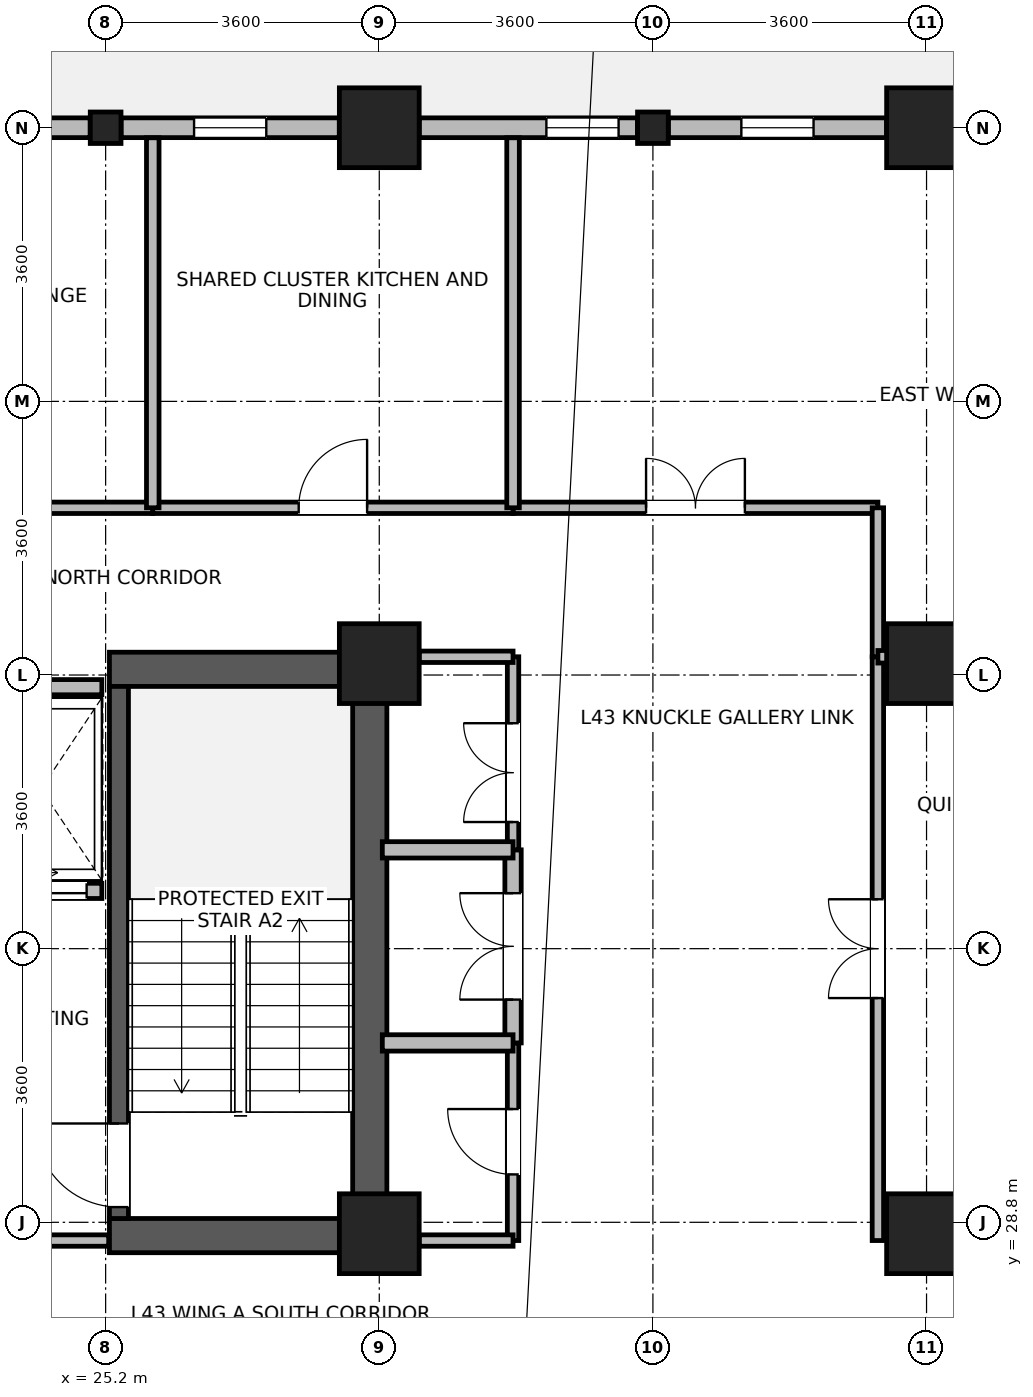
"""IFC4 building model, lengths in metres.
Left out: names, types, materials, properties, quantities, classifications, styles, units other than length and angle.
Written with IfcOpenShell. Run it as: python <this file> out.ifc"""

import sys

from ifc_helpers import new_model, si_unit, direction, frame, frame_2d, origin, origin_2d, place, context, subcontext, project, spatial, rectangle, i_section, extrude, source, transform, mapped, element, fill, save


model = new_model("IFC4")
c1 = context("Model", 3, precision=1e-05, world=origin(), true_north=direction((0.0, 1.0)))
c2 = subcontext(c1, "Body", "Model", "MODEL_VIEW")
j1 = project(units=[si_unit("LENGTHUNIT", "METRE"), si_unit("PLANEANGLEUNIT", "RADIAN")], contexts=[c1])
p1 = place(None, origin())
s1 = spatial("IfcSite", under=j1, at=p1, CompositionType="ELEMENT")
p2 = place(p1, origin())
s2 = spatial("IfcBuilding", under=s1, at=p2, CompositionType="ELEMENT")
p3 = place(p2, frame((0.0, 0.0, 169.8)))
s3 = spatial("IfcBuildingStorey", under=s2, at=p3, CompositionType="ELEMENT", Elevation=169.8)
p4 = place(p3, frame((28.675, 28.4, 0.0), z_axis=(0.0, 0.0, 1.0), x_axis=(0.0, 1.0, 0.0)))
e1 = element("IfcWall", 1, at=p4, inside=s3, PredefinedType="SHEAR", context=c2, shape_type="SweptSolid", body=[
    extrude(rectangle(XDim=7.9, YDim=0.45, at=frame_2d((3.95, 0.0))), origin(), (0.0, 0.0, 1.0), 3.46),
])
for number, where, z_axis, x_axis in (
    (2, (25.25, 28.625, 0.0), (0.0, 0.0, 1.0), (1.0, 0.0, 0.0)),
    (3, (25.25, 36.075, 0.0), (0.0, 0.0, 1.0), (1.0, 0.0, 0.0)),
):
    element("IfcWall", number, at=place(p3, frame(where, z_axis=z_axis, x_axis=x_axis)), inside=s3, PredefinedType="SHEAR", context=c2, shape_type="SweptSolid", body=[
        extrude(rectangle(XDim=3.2, YDim=0.45, at=frame_2d((1.6, 0.0))), origin(), (0.0, 0.0, 1.0), 3.46),
    ])
p5 = place(p3, frame((25.375, 28.85, 0.0), z_axis=(0.0, 0.0, 1.0), x_axis=(0.0, 1.0, 0.0)))
e4 = element("IfcWall", 4, at=p5, inside=s3, PredefinedType="SHEAR", context=c2, shape_type="SweptSolid", body=[
    extrude(rectangle(XDim=7.0, YDim=0.25, at=frame_2d((3.5, 0.0))), origin(), (0.0, 0.0, 1.0), 3.46),
])
p6 = place(p5, frame((0.15, 0.0, 0.0)))
e5 = element("IfcOpeningElement", 5, at=p6, cuts=e4, PredefinedType="OPENING", context=c2, shape_type="SweptSolid", body=[
    extrude(rectangle(XDim=1.1, YDim=2.08, at=frame_2d((0.55, 1.04))), frame((0.0, 0.135, 0.0), z_axis=(0.0, -1.0, 0.0), x_axis=(1.0, 0.0, 0.0)), (0.0, 0.0, 1.0), 0.27),
])
m1 = source(origin(), c2, "Body", "SweptSolid", [
    extrude(rectangle(XDim=1.05, YDim=1.05, at=origin_2d()), origin(), (0.0, 0.0, 1.0), 3.7),
])
for number, where, z_axis, x_axis in (
    (6, (28.8, 28.65, 0.0), (0.0, 0.0, 1.0), (1.0, 0.0, 0.0)),
    (7, (28.8, 36.15, 0.0), (0.0, 0.0, 1.0), (1.0, 0.0, 0.0)),
    (8, (28.8, 43.2, 0.0), (0.0, 0.0, 1.0), (1.0, 0.0, 0.0)),
    (9, (36.0, 43.2, 0.0), (0.0, 0.0, 1.0), (1.0, 0.0, 0.0)),
    (10, (36.0, 28.65, 0.0), (0.0, 0.0, 1.0), (1.0, 0.0, 0.0)),
    (11, (36.0, 36.15, 0.0), (0.0, 0.0, 1.0), (1.0, 0.0, 0.0)),
):
    element("IfcColumn", number, at=place(p3, frame(where, z_axis=z_axis, x_axis=x_axis)), inside=s3, PredefinedType="COLUMN", context=c2, shape_type="MappedRepresentation", body=[
        mapped(m1, transform((0.0, 0.0, 0.0), x_axis=(1.0, 0.0, 0.0), y_axis=(0.0, 1.0, 0.0), z_axis=(0.0, 0.0, 1.0), scale=1.0)),
    ])
m2 = source(origin(), c2, "Body", "SweptSolid", [
    extrude(i_section(OverallWidth=0.404, OverallDepth=0.414, WebThickness=0.021, FlangeThickness=0.028, FilletRadius=0.015, at=origin_2d()), origin(), (0.0, 0.0, 1.0), 3.7),
])
for number, where, z_axis, x_axis in (
    (12, (25.2, 43.2, 0.0), (0.0, 0.0, 1.0), (1.0, 0.0, 0.0)),
    (13, (32.4, 43.2, 0.0), (0.0, 0.0, 1.0), (1.0, 0.0, 0.0)),
):
    element("IfcColumn", number, at=place(p3, frame(where, z_axis=z_axis, x_axis=x_axis)), inside=s3, PredefinedType="COLUMN", context=c2, shape_type="MappedRepresentation", body=[
        mapped(m2, transform((0.0, 0.0, 0.0), x_axis=(1.0, 0.0, 0.0), y_axis=(0.0, 1.0, 0.0), z_axis=(0.0, 0.0, 1.0), scale=1.0)),
    ])
p7 = place(p3, frame((32.603, 43.2, 0.0), z_axis=(0.0, 0.0, 1.0), x_axis=(1.0, 0.0, 0.0)))
e14 = element("IfcWall", 14, at=p7, inside=s3, PredefinedType="STANDARD", context=c2, shape_type="SweptSolid", body=[
    extrude(rectangle(XDim=2.871, YDim=0.26, at=frame_2d((1.436, 0.0))), origin(), (0.0, 0.0, 1.0), 2.99),
])
p8 = place(p7, frame((0.96, 0.0, 0.85)))
e15 = element("IfcOpeningElement", 15, at=p8, cuts=e14, PredefinedType="OPENING", context=c2, shape_type="SweptSolid", body=[
    extrude(rectangle(XDim=0.95, YDim=1.75, at=frame_2d((0.475, 0.875))), frame((0.0, 0.14, 0.0), z_axis=(0.0, -1.0, 0.0), x_axis=(1.0, 0.0, 0.0)), (0.0, 0.0, 1.0), 0.28),
])
p9 = place(p3, frame((29.326, 43.2, 0.0), z_axis=(0.0, 0.0, 1.0), x_axis=(1.0, 0.0, 0.0)))
e16 = element("IfcWall", 16, at=p9, inside=s3, PredefinedType="STANDARD", context=c2, shape_type="SweptSolid", body=[
    extrude(rectangle(XDim=2.871, YDim=0.26, at=frame_2d((1.436, 0.0))), origin(), (0.0, 0.0, 1.0), 2.99),
])
p10 = place(p9, frame((1.673, 0.0, 0.85)))
e17 = element("IfcOpeningElement", 17, at=p10, cuts=e16, PredefinedType="OPENING", context=c2, shape_type="SweptSolid", body=[
    extrude(rectangle(XDim=0.95, YDim=1.75, at=frame_2d((0.475, 0.875))), frame((0.0, 0.14, 0.0), z_axis=(0.0, -1.0, 0.0), x_axis=(1.0, 0.0, 0.0)), (0.0, 0.0, 1.0), 0.28),
])
p11 = place(p3, frame((25.403, 43.2, 0.0), z_axis=(0.0, 0.0, 1.0), x_axis=(1.0, 0.0, 0.0)))
e18 = element("IfcWall", 18, at=p11, inside=s3, PredefinedType="STANDARD", context=c2, shape_type="SweptSolid", body=[
    extrude(rectangle(XDim=2.871, YDim=0.26, at=frame_2d((1.436, 0.0))), origin(), (0.0, 0.0, 1.0), 2.99),
])
p12 = place(p11, frame((0.96, 0.0, 0.85)))
e19 = element("IfcOpeningElement", 19, at=p12, cuts=e18, PredefinedType="OPENING", context=c2, shape_type="SweptSolid", body=[
    extrude(rectangle(XDim=0.95, YDim=1.75, at=frame_2d((0.475, 0.875))), frame((0.0, 0.14, 0.0), z_axis=(0.0, -1.0, 0.0), x_axis=(1.0, 0.0, 0.0)), (0.0, 0.0, 1.0), 0.28),
])
p13 = place(p3, frame((22.126, 43.2, 0.0), z_axis=(0.0, 0.0, 1.0), x_axis=(1.0, 0.0, 0.0)))
e20 = element("IfcWall", 20, at=p13, inside=s3, PredefinedType="STANDARD", context=c2, shape_type="SweptSolid", body=[
    extrude(rectangle(XDim=2.871, YDim=0.26, at=frame_2d((1.436, 0.0))), origin(), (0.0, 0.0, 1.0), 2.99),
])
p14 = place(p13, frame((0.96, 0.0, 0.85)))
e21 = element("IfcOpeningElement", 21, at=p14, cuts=e20, PredefinedType="OPENING", context=c2, shape_type="SweptSolid", body=[
    extrude(rectangle(XDim=0.95, YDim=1.75, at=frame_2d((0.475, 0.875))), frame((0.0, 0.14, 0.0), z_axis=(0.0, -1.0, 0.0), x_axis=(1.0, 0.0, 0.0)), (0.0, 0.0, 1.0), 0.28),
])
p15 = place(p3, frame((23.55, 33.16, 0.0), z_axis=(0.0, 0.0, 1.0), x_axis=(1.0, 0.0, 0.0)))
e22 = element("IfcWall", 22, at=p15, inside=s3, PredefinedType="PARTITIONING", context=c2, shape_type="SweptSolid", body=[
    extrude(rectangle(XDim=1.6, YDim=0.2, at=frame_2d((0.8, 0.0))), origin(), (0.0, 0.0, 1.0), 3.44),
])
p16 = place(p15, frame((0.2, 0.0, 0.0)))
e23 = element("IfcOpeningElement", 23, at=p16, cuts=e22, PredefinedType="OPENING", context=c2, shape_type="SweptSolid", body=[
    extrude(rectangle(XDim=1.2, YDim=2.12, at=frame_2d((0.6, 1.06))), frame((0.0, 0.11, 0.0), z_axis=(0.0, -1.0, 0.0), x_axis=(1.0, 0.0, 0.0)), (0.0, 0.0, 1.0), 0.22),
])
p17 = place(p3, frame((23.55, 35.84, 0.0), z_axis=(0.0, 0.0, 1.0), x_axis=(1.0, 0.0, 0.0)))
e24 = element("IfcWall", 24, at=p17, inside=s3, PredefinedType="PARTITIONING", context=c2, shape_type="SweptSolid", body=[
    extrude(rectangle(XDim=1.6, YDim=0.2, at=frame_2d((0.8, 0.0))), origin(), (0.0, 0.0, 1.0), 2.44),
])
p18 = place(p3, frame((35.36, 28.56, 0.0), z_axis=(0.0, 0.0, 1.0), x_axis=(0.0, 1.0, 0.0)))
e25 = element("IfcWall", 25, at=p18, inside=s3, PredefinedType="PARTITIONING", context=c2, shape_type="SweptSolid", body=[
    extrude(rectangle(XDim=7.68, YDim=0.15, at=frame_2d((3.84, 0.0))), origin(), (0.0, 0.0, 1.0), 3.44),
])
p19 = place(p18, frame((3.19, 0.0, 0.0)))
e26 = element("IfcOpeningElement", 26, at=p19, cuts=e25, PredefinedType="OPENING", context=c2, shape_type="SweptSolid", body=[
    extrude(rectangle(XDim=1.3, YDim=2.12, at=frame_2d((0.65, 1.06))), frame((0.0, 0.085, 0.0), z_axis=(0.0, -1.0, 0.0), x_axis=(1.0, 0.0, 0.0)), (0.0, 0.0, 1.0), 0.17),
])
p20 = place(p3, frame((20.66, 38.2, 0.0), z_axis=(0.0, 0.0, 1.0), x_axis=(1.0, 0.0, 0.0)))
e27 = element("IfcWall", 27, at=p20, inside=s3, PredefinedType="PARTITIONING", context=c2, shape_type="SweptSolid", body=[
    extrude(rectangle(XDim=5.16, YDim=0.15, at=frame_2d((2.58, 0.0))), origin(), (0.0, 0.0, 1.0), 3.44),
])
p21 = place(p20, frame((1.93, 0.0, 0.0)))
e28 = element("IfcOpeningElement", 28, at=p21, cuts=e27, PredefinedType="OPENING", context=c2, shape_type="SweptSolid", body=[
    extrude(rectangle(XDim=1.3, YDim=2.12, at=frame_2d((0.65, 1.06))), frame((0.0, 0.085, 0.0), z_axis=(0.0, -1.0, 0.0), x_axis=(1.0, 0.0, 0.0)), (0.0, 0.0, 1.0), 0.17),
])
p22 = place(p3, frame((30.56, 38.2, 0.0), z_axis=(0.0, 0.0, 1.0), x_axis=(1.0, 0.0, 0.0)))
e29 = element("IfcWall", 29, at=p22, inside=s3, PredefinedType="PARTITIONING", context=c2, shape_type="SweptSolid", body=[
    extrude(rectangle(XDim=4.8, YDim=0.15, at=frame_2d((2.4, 0.0))), origin(), (0.0, 0.0, 1.0), 3.44),
])
p23 = place(p22, frame((1.75, 0.0, 0.0)))
e30 = element("IfcOpeningElement", 30, at=p23, cuts=e29, PredefinedType="OPENING", context=c2, shape_type="SweptSolid", body=[
    extrude(rectangle(XDim=1.3, YDim=2.12, at=frame_2d((0.65, 1.06))), frame((0.0, 0.085, 0.0), z_axis=(0.0, -1.0, 0.0), x_axis=(1.0, 0.0, 0.0)), (0.0, 0.0, 1.0), 0.17),
])
p24 = place(p3, frame((25.82, 38.2, 0.0), z_axis=(0.0, 0.0, 1.0), x_axis=(1.0, 0.0, 0.0)))
e31 = element("IfcWall", 31, at=p24, inside=s3, PredefinedType="PARTITIONING", context=c2, shape_type="SweptSolid", body=[
    extrude(rectangle(XDim=4.74, YDim=0.15, at=frame_2d((2.37, 0.0))), origin(), (0.0, 0.0, 1.0), 3.44),
])
p25 = place(p24, frame((1.92, 0.0, 0.0)))
e32 = element("IfcOpeningElement", 32, at=p25, cuts=e31, PredefinedType="OPENING", context=c2, shape_type="SweptSolid", body=[
    extrude(rectangle(XDim=0.9, YDim=2.08, at=frame_2d((0.45, 1.04))), frame((0.0, 0.085, 0.0), z_axis=(0.0, -1.0, 0.0), x_axis=(1.0, 0.0, 0.0)), (0.0, 0.0, 1.0), 0.17),
])
p26 = place(p3, frame((30.56, 28.56, 0.0), z_axis=(0.0, 0.0, 1.0), x_axis=(0.0, 1.0, 0.0)))
e33 = element("IfcWall", 33, at=p26, inside=s3, PredefinedType="PARTITIONING", context=c2, shape_type="SweptSolid", body=[
    extrude(rectangle(XDim=2.6, YDim=0.15, at=frame_2d((1.3, 0.0))), origin(), (0.0, 0.0, 1.0), 3.44),
])
p27 = place(p26, frame((0.87, 0.0, 0.0)))
e34 = element("IfcOpeningElement", 34, at=p27, cuts=e33, PredefinedType="OPENING", context=c2, shape_type="SweptSolid", body=[
    extrude(rectangle(XDim=0.86, YDim=2.02, at=frame_2d((0.43, 1.01))), frame((0.0, 0.085, 0.0), z_axis=(0.0, -1.0, 0.0), x_axis=(1.0, 0.0, 0.0)), (0.0, 0.0, 1.0), 0.17),
])
p28 = place(p3, frame((30.56, 31.16, 0.0), z_axis=(0.0, 0.0, 1.0), x_axis=(0.0, 1.0, 0.0)))
e35 = element("IfcWall", 35, at=p28, inside=s3, PredefinedType="PARTITIONING", context=c2, shape_type="SweptSolid", body=[
    extrude(rectangle(XDim=2.54, YDim=0.215, at=frame_2d((1.27, 0.0))), origin(), (0.0, 0.0, 1.0), 3.44),
])
p29 = place(p28, frame((0.57, 0.0, 0.0)))
e36 = element("IfcOpeningElement", 36, at=p29, cuts=e35, PredefinedType="OPENING", context=c2, shape_type="SweptSolid", body=[
    extrude(rectangle(XDim=1.4, YDim=2.15, at=frame_2d((0.7, 1.075))), frame((0.0, 0.118, 0.0), z_axis=(0.0, -1.0, 0.0), x_axis=(1.0, 0.0, 0.0)), (0.0, 0.0, 1.0), 0.235),
])
p30 = place(p3, frame((30.56, 33.7, 0.0), z_axis=(0.0, 0.0, 1.0), x_axis=(0.0, 1.0, 0.0)))
e37 = element("IfcWall", 37, at=p30, inside=s3, PredefinedType="PARTITIONING", context=c2, shape_type="SweptSolid", body=[
    extrude(rectangle(XDim=2.54, YDim=0.15, at=frame_2d((1.27, 0.0))), origin(), (0.0, 0.0, 1.0), 3.44),
])
p31 = place(p30, frame((0.366, 0.0, 0.0)))
e38 = element("IfcOpeningElement", 38, at=p31, cuts=e37, PredefinedType="OPENING", context=c2, shape_type="SweptSolid", body=[
    extrude(rectangle(XDim=1.3, YDim=2.12, at=frame_2d((0.65, 1.06))), frame((0.0, 0.085, 0.0), z_axis=(0.0, -1.0, 0.0), x_axis=(1.0, 0.0, 0.0)), (0.0, 0.0, 1.0), 0.17),
])
p32 = place(p3, frame((35.36, 36.24, 0.0), z_axis=(0.0, 0.0, 1.0), x_axis=(0.0, 1.0, 0.0)))
e39 = element("IfcWall", 39, at=p32, inside=s3, PredefinedType="PARTITIONING", context=c2, shape_type="SweptSolid", body=[
    extrude(rectangle(XDim=1.96, YDim=0.15, at=frame_2d((0.98, 0.0))), origin(), (0.0, 0.0, 1.0), 3.44),
])
for number, where, z_axis, x_axis in (
    (40, (29.325, 28.56, 0.0), (0.0, 0.0, 1.0), (1.0, 0.0, 0.0)),
    (41, (29.325, 36.24, 0.0), (0.0, 0.0, 1.0), (1.0, 0.0, 0.0)),
):
    element("IfcWall", number, at=place(p3, frame(where, z_axis=z_axis, x_axis=x_axis)), inside=s3, PredefinedType="PARTITIONING", context=c2, shape_type="SweptSolid", body=[
        extrude(rectangle(XDim=1.235, YDim=0.15, at=frame_2d((0.618, 0.0))), origin(), (0.0, 0.0, 1.0), 2.84),
    ])
for number, where, z_axis, x_axis in (
    (42, (25.82, 38.2, 0.0), (0.0, 0.0, 1.0), (0.0, 1.0, 0.0)),
    (43, (30.56, 38.2, 0.0), (0.0, 0.0, 1.0), (0.0, 1.0, 0.0)),
):
    element("IfcWall", number, at=place(p3, frame(where, z_axis=z_axis, x_axis=x_axis)), inside=s3, PredefinedType="PARTITIONING", context=c2, shape_type="SweptSolid", body=[
        extrude(rectangle(XDim=4.868, YDim=0.165, at=frame_2d((2.434, 0.0))), origin(), (0.0, 0.0, 1.0), 3.44),
    ])
p33 = place(p3, frame((35.36, 36.24, 0.0), z_axis=(0.0, 0.0, 1.0), x_axis=(1.0, 0.0, 0.0)))
e44 = element("IfcWall", 44, at=p33, inside=s3, PredefinedType="PARTITIONING", context=c2, shape_type="SweptSolid", body=[
    extrude(rectangle(XDim=4.38, YDim=0.165, at=frame_2d((2.19, 0.0))), origin(), (0.0, 0.0, 1.0), 2.84),
])
p34 = place(p3, frame((21.76, 28.56, 0.0), z_axis=(0.0, 0.0, 1.0), x_axis=(1.0, 0.0, 0.0)))
e45 = element("IfcWall", 45, at=p34, inside=s3, PredefinedType="PARTITIONING", context=c2, shape_type="SweptSolid", body=[
    extrude(rectangle(XDim=3.48, YDim=0.15, at=frame_2d((1.74, 0.0))), origin(), (0.0, 0.0, 1.0), 2.44),
])
p35 = place(p34, frame((0.99, 0.0, 0.0)))
e46 = element("IfcOpeningElement", 46, at=p35, cuts=e45, PredefinedType="OPENING", context=c2, shape_type="SweptSolid", body=[
    extrude(rectangle(XDim=1.5, YDim=2.1, at=frame_2d((0.75, 1.05))), frame((0.0, 0.085, 0.0), z_axis=(0.0, -1.0, 0.0), x_axis=(1.0, 0.0, 0.0)), (0.0, 0.0, 1.0), 0.17),
])
for number, where, z_axis, x_axis in (
    (47, (28.84, 31.16, 0.0), (0.0, 0.0, 1.0), (1.0, 0.0, 0.0)),
    (48, (28.84, 33.7, 0.0), (0.0, 0.0, 1.0), (1.0, 0.0, 0.0)),
):
    element("IfcWall", number, at=place(p3, frame(where, z_axis=z_axis, x_axis=x_axis)), inside=s3, PredefinedType="PARTITIONING", context=c2, shape_type="SweptSolid", body=[
        extrude(rectangle(XDim=1.72, YDim=0.215, at=frame_2d((0.86, 0.0))), origin(), (0.0, 0.0, 1.0), 3.44),
    ])
p36 = place(p8, origin())
e49 = element("IfcWindow", 49, at=p36, inside=s3, PartitioningType="SINGLE_PANEL", PredefinedType="WINDOW", context=c2, shape_type="SweptSolid", body=[
    extrude(rectangle(XDim=0.95, YDim=1.75, at=frame_2d((0.475, 0.875))), frame((0.0, 0.03, 0.0), z_axis=(0.0, -1.0, 0.0), x_axis=(1.0, 0.0, 0.0)), (0.0, 0.0, 1.0), 0.06),
])
fill(e15, e49)
p37 = place(p10, origin())
e50 = element("IfcWindow", 50, at=p37, inside=s3, PartitioningType="SINGLE_PANEL", PredefinedType="WINDOW", context=c2, shape_type="SweptSolid", body=[
    extrude(rectangle(XDim=0.95, YDim=1.75, at=frame_2d((0.475, 0.875))), frame((0.0, 0.03, 0.0), z_axis=(0.0, -1.0, 0.0), x_axis=(1.0, 0.0, 0.0)), (0.0, 0.0, 1.0), 0.06),
])
fill(e17, e50)
p38 = place(p12, origin())
e51 = element("IfcWindow", 51, at=p38, inside=s3, PartitioningType="SINGLE_PANEL", PredefinedType="WINDOW", context=c2, shape_type="SweptSolid", body=[
    extrude(rectangle(XDim=0.95, YDim=1.75, at=frame_2d((0.475, 0.875))), frame((0.0, 0.03, 0.0), z_axis=(0.0, -1.0, 0.0), x_axis=(1.0, 0.0, 0.0)), (0.0, 0.0, 1.0), 0.06),
])
fill(e19, e51)
p39 = place(p6, origin())
e52 = element("IfcDoor", 52, at=p39, inside=s3, OperationType="SINGLE_SWING_RIGHT", PredefinedType="DOOR", context=c2, shape_type="SweptSolid", body=[
    extrude(rectangle(XDim=1.1, YDim=2.08, at=frame_2d((0.55, 1.04))), frame((0.0, 0.025, 0.0), z_axis=(0.0, -1.0, 0.0), x_axis=(1.0, 0.0, 0.0)), (0.0, 0.0, 1.0), 0.05),
])
fill(e5, e52)
p40 = place(p16, origin())
e53 = element("IfcDoor", 53, at=p40, inside=s3, OperationType="SLIDING_TO_RIGHT", PredefinedType="DOOR", context=c2, shape_type="SweptSolid", body=[
    extrude(rectangle(XDim=1.2, YDim=2.12, at=frame_2d((0.6, 1.06))), frame((0.0, 0.025, 0.0), z_axis=(0.0, -1.0, 0.0), x_axis=(1.0, 0.0, 0.0)), (0.0, 0.0, 1.0), 0.05),
])
fill(e23, e53)
p41 = place(p19, origin())
e54 = element("IfcDoor", 54, at=p41, inside=s3, OperationType="DOUBLE_DOOR_SINGLE_SWING", PredefinedType="DOOR", context=c2, shape_type="SweptSolid", body=[
    extrude(rectangle(XDim=1.3, YDim=2.12, at=frame_2d((0.65, 1.06))), frame((0.0, 0.025, 0.0), z_axis=(0.0, -1.0, 0.0), x_axis=(1.0, 0.0, 0.0)), (0.0, 0.0, 1.0), 0.05),
])
fill(e26, e54)
p42 = place(p23, origin())
e55 = element("IfcDoor", 55, at=p42, inside=s3, OperationType="DOUBLE_DOOR_SINGLE_SWING", PredefinedType="DOOR", context=c2, shape_type="SweptSolid", body=[
    extrude(rectangle(XDim=1.3, YDim=2.12, at=frame_2d((0.65, 1.06))), frame((0.0, 0.025, 0.0), z_axis=(0.0, -1.0, 0.0), x_axis=(1.0, 0.0, 0.0)), (0.0, 0.0, 1.0), 0.05),
])
fill(e30, e55)
p43 = place(p25, origin())
e56 = element("IfcDoor", 56, at=p43, inside=s3, OperationType="SINGLE_SWING_RIGHT", PredefinedType="DOOR", context=c2, shape_type="SweptSolid", body=[
    extrude(rectangle(XDim=0.9, YDim=2.08, at=frame_2d((0.45, 1.04))), frame((0.0, 0.025, 0.0), z_axis=(0.0, -1.0, 0.0), x_axis=(1.0, 0.0, 0.0)), (0.0, 0.0, 1.0), 0.05),
])
fill(e32, e56)
p44 = place(p27, origin())
e57 = element("IfcDoor", 57, at=p44, inside=s3, OperationType="SINGLE_SWING_RIGHT", PredefinedType="DOOR", context=c2, shape_type="SweptSolid", body=[
    extrude(rectangle(XDim=0.86, YDim=2.02, at=frame_2d((0.43, 1.01))), frame((0.0, 0.025, 0.0), z_axis=(0.0, -1.0, 0.0), x_axis=(1.0, 0.0, 0.0)), (0.0, 0.0, 1.0), 0.05),
])
fill(e34, e57)
p45 = place(p29, origin())
e58 = element("IfcDoor", 58, at=p45, inside=s3, OperationType="DOUBLE_DOOR_SINGLE_SWING", PredefinedType="DOOR", context=c2, shape_type="SweptSolid", body=[
    extrude(rectangle(XDim=1.4, YDim=2.15, at=frame_2d((0.7, 1.075))), frame((0.0, 0.025, 0.0), z_axis=(0.0, -1.0, 0.0), x_axis=(1.0, 0.0, 0.0)), (0.0, 0.0, 1.0), 0.05),
])
fill(e36, e58)
p46 = place(p31, origin())
e59 = element("IfcDoor", 59, at=p46, inside=s3, OperationType="DOUBLE_DOOR_SINGLE_SWING", PredefinedType="DOOR", context=c2, shape_type="SweptSolid", body=[
    extrude(rectangle(XDim=1.3, YDim=2.12, at=frame_2d((0.65, 1.06))), frame((0.0, 0.025, 0.0), z_axis=(0.0, -1.0, 0.0), x_axis=(1.0, 0.0, 0.0)), (0.0, 0.0, 1.0), 0.05),
])
fill(e38, e59)
save(model, sys.argv[1])
